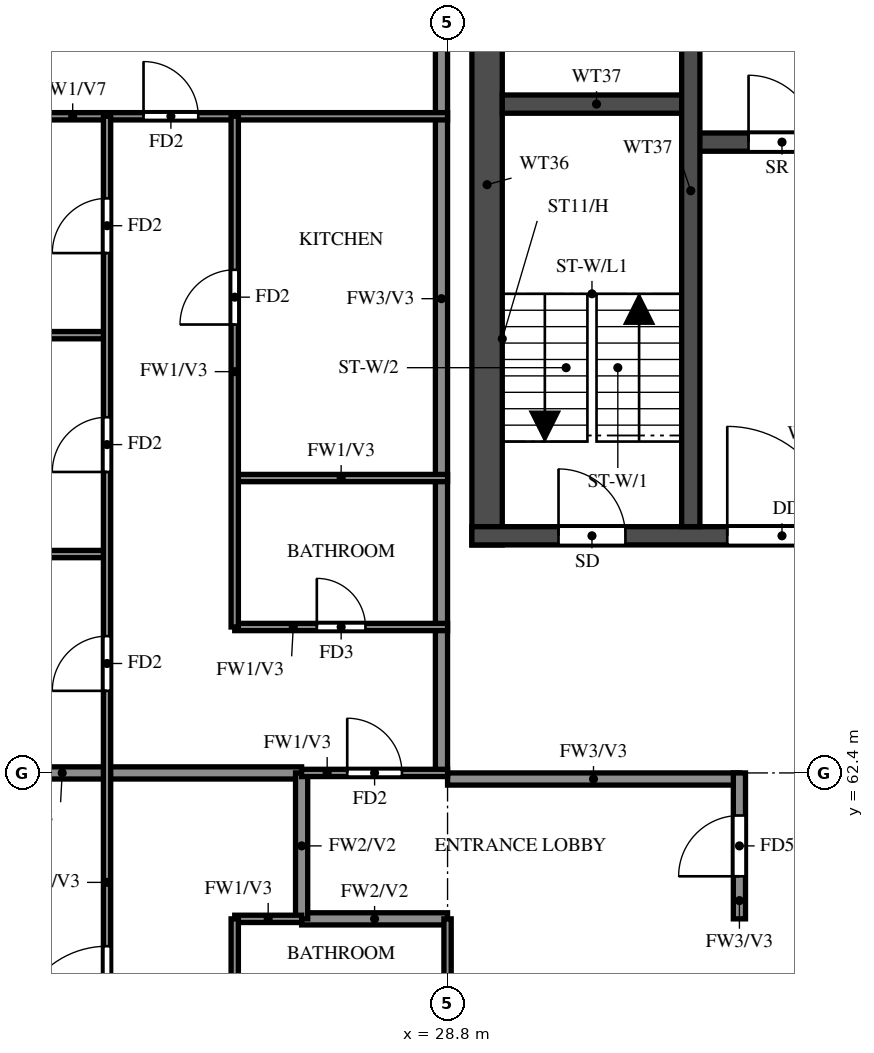
"""IFC4 building model, lengths in metres.
Left out: names, types, materials, properties, quantities, classifications, styles, units other than length and angle.
Written with IfcOpenShell. Run it as: python <this file> out.ifc"""

import sys

from ifc_helpers import new_model, si_unit, direction, frame, frame_2d, origin, place, context, subcontext, project, spatial, rectangle, extrude, element, fill, save


model = new_model("IFC4")
c1 = context("Model", 3, precision=1e-05, world=origin(), true_north=direction((0.0, 1.0)))
c2 = subcontext(c1, "Body", "Model", "MODEL_VIEW")
j1 = project(units=[si_unit("LENGTHUNIT", "METRE"), si_unit("PLANEANGLEUNIT", "RADIAN")], contexts=[c1])
p1 = place(None, origin())
s1 = spatial("IfcSite", under=j1, at=p1, CompositionType="ELEMENT")
p2 = place(p1, origin())
s2 = spatial("IfcBuilding", under=s1, at=p2, CompositionType="ELEMENT")
p3 = place(p2, frame((0.0, 0.0, 225.5)))
s3 = spatial("IfcBuildingStorey", under=s2, at=p3, CompositionType="ELEMENT", Elevation=225.5)
p4 = place(p3, frame((29.45, 66.15, 0.0), z_axis=(0.0, 0.0, 1.0), x_axis=(0.0, 1.0, 0.0)))
e1 = element("IfcWall", 1, at=p4, inside=s3, PredefinedType="SHEAR", context=c2, shape_type="SweptSolid", body=[
    extrude(rectangle(XDim=11.85, YDim=0.5, at=frame_2d((5.925, 0.0))), origin(), (0.0, 0.0, 1.0), 3.22),
])
p5 = place(p3, frame((29.2, 66.3, 0.0), z_axis=(0.0, 0.0, 1.0), x_axis=(1.0, 0.0, 0.0)))
e2 = element("IfcWall", 2, at=p5, inside=s3, PredefinedType="SHEAR", context=c2, shape_type="SweptSolid", body=[
    extrude(rectangle(XDim=42.4, YDim=0.3, at=frame_2d((21.2, 0.0))), origin(), (0.0, 0.0, 1.0), 3.22),
])
p6 = place(p5, frame((1.425, 0.0, 0.0)))
e3 = element("IfcOpeningElement", 3, at=p6, cuts=e2, PredefinedType="OPENING", context=c2, shape_type="SweptSolid", body=[
    extrude(rectangle(XDim=1.1, YDim=2.1, at=frame_2d((0.55, 1.05))), frame((0.0, 0.16, 0.0), z_axis=(0.0, -1.0, 0.0), x_axis=(1.0, 0.0, 0.0)), (0.0, 0.0, 1.0), 0.32),
])
p7 = place(p5, frame((4.2, 0.0, 0.0)))
e4 = element("IfcOpeningElement", 4, at=p7, cuts=e2, PredefinedType="OPENING", context=c2, shape_type="SweptSolid", body=[
    extrude(rectangle(XDim=1.8, YDim=2.1, at=frame_2d((0.9, 1.05))), frame((0.0, 0.16, 0.0), z_axis=(0.0, -1.0, 0.0), x_axis=(1.0, 0.0, 0.0)), (0.0, 0.0, 1.0), 0.32),
])
p8 = place(p3, frame((32.8, 72.775, 0.0), z_axis=(0.0, 0.0, 1.0), x_axis=(1.0, 0.0, 0.0)))
e5 = element("IfcWall", 5, at=p8, inside=s3, PredefinedType="SHEAR", context=c2, shape_type="SweptSolid", body=[
    extrude(rectangle(XDim=35.2, YDim=0.3, at=frame_2d((17.6, 0.0))), origin(), (0.0, 0.0, 1.0), 3.22),
])
p9 = place(p8, frame((19.8, 0.0, 0.0)))
e6 = element("IfcOpeningElement", 6, at=p9, cuts=e5, PredefinedType="OPENING", context=c2, shape_type="SweptSolid", body=[
    extrude(rectangle(XDim=1.1, YDim=2.1, at=frame_2d((0.55, 1.05))), frame((0.0, 0.16, 0.0), z_axis=(0.0, -1.0, 0.0), x_axis=(1.0, 0.0, 0.0)), (0.0, 0.0, 1.0), 0.32),
])
p10 = place(p8, frame((27.725, 0.0, 0.0)))
e7 = element("IfcOpeningElement", 7, at=p10, cuts=e5, PredefinedType="OPENING", context=c2, shape_type="SweptSolid", body=[
    extrude(rectangle(XDim=1.1, YDim=2.1, at=frame_2d((0.55, 1.05))), frame((0.0, 0.16, 0.0), z_axis=(0.0, -1.0, 0.0), x_axis=(1.0, 0.0, 0.0)), (0.0, 0.0, 1.0), 0.32),
])
p11 = place(p8, frame((30.325, 0.0, 0.0)))
e8 = element("IfcOpeningElement", 8, at=p11, cuts=e5, PredefinedType="OPENING", context=c2, shape_type="SweptSolid", body=[
    extrude(rectangle(XDim=1.1, YDim=2.1, at=frame_2d((0.55, 1.05))), frame((0.0, 0.16, 0.0), z_axis=(0.0, -1.0, 0.0), x_axis=(1.0, 0.0, 0.0)), (0.0, 0.0, 1.0), 0.32),
])
p12 = place(p8, frame((3.825, 0.0, 0.0)))
e9 = element("IfcOpeningElement", 9, at=p12, cuts=e5, PredefinedType="OPENING", context=c2, shape_type="SweptSolid", body=[
    extrude(rectangle(XDim=1.1, YDim=2.1, at=frame_2d((0.55, 1.05))), frame((0.0, 0.16, 0.0), z_axis=(0.0, -1.0, 0.0), x_axis=(1.0, 0.0, 0.0)), (0.0, 0.0, 1.0), 0.32),
])
p13 = place(p8, frame((6.575, 0.0, 0.0)))
e10 = element("IfcOpeningElement", 10, at=p13, cuts=e5, PredefinedType="OPENING", context=c2, shape_type="SweptSolid", body=[
    extrude(rectangle(XDim=1.1, YDim=2.1, at=frame_2d((0.55, 1.05))), frame((0.0, 0.16, 0.0), z_axis=(0.0, -1.0, 0.0), x_axis=(1.0, 0.0, 0.0)), (0.0, 0.0, 1.0), 0.32),
])
p14 = place(p8, frame((9.325, 0.0, 0.0)))
e11 = element("IfcOpeningElement", 11, at=p14, cuts=e5, PredefinedType="OPENING", context=c2, shape_type="SweptSolid", body=[
    extrude(rectangle(XDim=1.1, YDim=2.1, at=frame_2d((0.55, 1.05))), frame((0.0, 0.16, 0.0), z_axis=(0.0, -1.0, 0.0), x_axis=(1.0, 0.0, 0.0)), (0.0, 0.0, 1.0), 0.32),
])
p15 = place(p8, frame((12.075, 0.0, 0.0)))
e12 = element("IfcOpeningElement", 12, at=p15, cuts=e5, PredefinedType="OPENING", context=c2, shape_type="SweptSolid", body=[
    extrude(rectangle(XDim=1.1, YDim=2.1, at=frame_2d((0.55, 1.05))), frame((0.0, 0.16, 0.0), z_axis=(0.0, -1.0, 0.0), x_axis=(1.0, 0.0, 0.0)), (0.0, 0.0, 1.0), 0.32),
])
p16 = place(p8, frame((14.825, 0.0, 0.0)))
e13 = element("IfcOpeningElement", 13, at=p16, cuts=e5, PredefinedType="OPENING", context=c2, shape_type="SweptSolid", body=[
    extrude(rectangle(XDim=1.1, YDim=2.1, at=frame_2d((0.55, 1.05))), frame((0.0, 0.16, 0.0), z_axis=(0.0, -1.0, 0.0), x_axis=(1.0, 0.0, 0.0)), (0.0, 0.0, 1.0), 0.32),
])
p17 = place(p8, frame((17.575, 0.0, 0.0)))
e14 = element("IfcOpeningElement", 14, at=p17, cuts=e5, PredefinedType="OPENING", context=c2, shape_type="SweptSolid", body=[
    extrude(rectangle(XDim=1.1, YDim=2.1, at=frame_2d((0.55, 1.05))), frame((0.0, 0.16, 0.0), z_axis=(0.0, -1.0, 0.0), x_axis=(1.0, 0.0, 0.0)), (0.0, 0.0, 1.0), 0.32),
])
p18 = place(p8, frame((0.95, 0.0, 0.0)))
e15 = element("IfcOpeningElement", 15, at=p18, cuts=e5, PredefinedType="OPENING", context=c2, shape_type="SweptSolid", body=[
    extrude(rectangle(XDim=1.1, YDim=2.1, at=frame_2d((0.55, 1.05))), frame((0.0, 0.16, 0.0), z_axis=(0.0, -1.0, 0.0), x_axis=(1.0, 0.0, 0.0)), (0.0, 0.0, 1.0), 0.32),
])
p19 = place(p3, frame((29.7, 73.4, 0.0), z_axis=(0.0, 0.0, 1.0), x_axis=(1.0, 0.0, 0.0)))
e16 = element("IfcWall", 16, at=p19, inside=s3, PredefinedType="SHEAR", context=c2, shape_type="SweptSolid", body=[
    extrude(rectangle(XDim=3.1, YDim=0.3, at=frame_2d((1.55, 0.0))), origin(), (0.0, 0.0, 1.0), 3.22),
])
p20 = place(p3, frame((32.8, 66.45, 0.0), z_axis=(0.0, 0.0, 1.0), x_axis=(0.0, 1.0, 0.0)))
e17 = element("IfcWall", 17, at=p20, inside=s3, PredefinedType="SHEAR", context=c2, shape_type="SweptSolid", body=[
    extrude(rectangle(XDim=11.05, YDim=0.3, at=frame_2d((5.525, 0.0))), origin(), (0.0, 0.0, 1.0), 3.22),
])
p21 = place(p3, frame((28.8, 62.3, 0.0), z_axis=(0.0, 0.0, 1.0), x_axis=(1.0, 0.0, 0.0)))
e18 = element("IfcWall", 18, at=p21, inside=s3, PredefinedType="SOLIDWALL", context=c2, shape_type="SweptSolid", body=[
    extrude(rectangle(XDim=4.8, YDim=0.2, at=frame_2d((2.4, 0.0))), origin(), (0.0, 0.0, 1.0), 3.22),
])
p22 = place(p3, frame((28.7, 62.4, 0.0), z_axis=(0.0, 0.0, 1.0), x_axis=(0.0, 1.0, 0.0)))
e19 = element("IfcWall", 19, at=p22, inside=s3, PredefinedType="SOLIDWALL", context=c2, shape_type="SweptSolid", body=[
    extrude(rectangle(XDim=15.6, YDim=0.2, at=frame_2d((7.8, 0.0))), origin(), (0.0, 0.0, 1.0), 3.22),
])
p23 = place(p3, frame((33.6, 60.0, 0.0), z_axis=(0.0, 0.0, 1.0), x_axis=(0.0, 1.0, 0.0)))
e20 = element("IfcWall", 20, at=p23, inside=s3, PredefinedType="SOLIDWALL", context=c2, shape_type="SweptSolid", body=[
    extrude(rectangle(XDim=2.4, YDim=0.2, at=frame_2d((1.2, 0.0))), origin(), (0.0, 0.0, 1.0), 3.22),
])
p24 = place(p23, frame((0.7, 0.0, 0.0)))
e21 = element("IfcOpeningElement", 21, at=p24, cuts=e20, PredefinedType="OPENING", context=c2, shape_type="SweptSolid", body=[
    extrude(rectangle(XDim=1.0, YDim=2.1, at=frame_2d((0.5, 1.05))), frame((0.0, 0.11, 0.0), z_axis=(0.0, -1.0, 0.0), x_axis=(1.0, 0.0, 0.0)), (0.0, 0.0, 1.0), 0.22),
])
p25 = place(p3, frame((26.4, 60.0, 0.0), z_axis=(0.0, 0.0, 1.0), x_axis=(1.0, 0.0, 0.0)))
e22 = element("IfcWall", 22, at=p25, inside=s3, PredefinedType="SOLIDWALL", context=c2, shape_type="SweptSolid", body=[
    extrude(rectangle(XDim=2.4, YDim=0.2, at=frame_2d((1.2, 0.0))), origin(), (0.0, 0.0, 1.0), 3.22),
])
p26 = place(p3, frame((18.525, 62.4, 0.0), z_axis=(0.0, 0.0, 1.0), x_axis=(1.0, 0.0, 0.0)))
e23 = element("IfcWall", 23, at=p26, inside=s3, PredefinedType="SOLIDWALL", context=c2, shape_type="SweptSolid", body=[
    extrude(rectangle(XDim=7.875, YDim=0.2, at=frame_2d((3.938, 0.0))), origin(), (0.0, 0.0, 1.0), 3.22),
])
p27 = place(p3, frame((26.4, 60.0, 0.0), z_axis=(0.0, 0.0, 1.0), x_axis=(0.0, 1.0, 0.0)))
e24 = element("IfcWall", 24, at=p27, inside=s3, PredefinedType="SOLIDWALL", context=c2, shape_type="SweptSolid", body=[
    extrude(rectangle(XDim=2.4, YDim=0.2, at=frame_2d((1.2, 0.0))), origin(), (0.0, 0.0, 1.0), 3.22),
])
p28 = place(p3, frame((25.3, 60.0, 0.0), z_axis=(0.0, 0.0, 1.0), x_axis=(1.0, 0.0, 0.0)))
e25 = element("IfcWall", 25, at=p28, inside=s3, PredefinedType="PARTITIONING", context=c2, shape_type="SweptSolid", body=[
    extrude(rectangle(XDim=1.1, YDim=0.12, at=frame_2d((0.55, 0.0))), origin(), (0.0, 0.0, 1.0), 3.22),
])
p29 = place(p3, frame((26.4, 62.4, 0.0), z_axis=(0.0, 0.0, 1.0), x_axis=(1.0, 0.0, 0.0)))
e26 = element("IfcWall", 26, at=p29, inside=s3, PredefinedType="PARTITIONING", context=c2, shape_type="SweptSolid", body=[
    extrude(rectangle(XDim=2.4, YDim=0.12, at=frame_2d((1.2, 0.0))), origin(), (0.0, 0.0, 1.0), 3.22),
])
p30 = place(p29, frame((0.75, 0.0, 0.0)))
e27 = element("IfcOpeningElement", 27, at=p30, cuts=e26, PredefinedType="OPENING", context=c2, shape_type="SweptSolid", body=[
    extrude(rectangle(XDim=0.9, YDim=2.1, at=frame_2d((0.45, 1.05))), frame((0.0, 0.07, 0.0), z_axis=(0.0, -1.0, 0.0), x_axis=(1.0, 0.0, 0.0)), (0.0, 0.0, 1.0), 0.14),
])
p31 = place(p3, frame((25.3, 64.8, 0.0), z_axis=(0.0, 0.0, 1.0), x_axis=(1.0, 0.0, 0.0)))
e28 = element("IfcWall", 28, at=p31, inside=s3, PredefinedType="PARTITIONING", context=c2, shape_type="SweptSolid", body=[
    extrude(rectangle(XDim=3.5, YDim=0.12, at=frame_2d((1.75, 0.0))), origin(), (0.0, 0.0, 1.0), 3.22),
])
p32 = place(p31, frame((1.35, 0.0, 0.0)))
e29 = element("IfcOpeningElement", 29, at=p32, cuts=e28, PredefinedType="OPENING", context=c2, shape_type="SweptSolid", body=[
    extrude(rectangle(XDim=0.8, YDim=2.1, at=frame_2d((0.4, 1.05))), frame((0.0, 0.07, 0.0), z_axis=(0.0, -1.0, 0.0), x_axis=(1.0, 0.0, 0.0)), (0.0, 0.0, 1.0), 0.14),
])
p33 = place(p3, frame((18.525, 66.0, 0.0), z_axis=(0.0, 0.0, 1.0), x_axis=(1.0, 0.0, 0.0)))
e30 = element("IfcWall", 30, at=p33, inside=s3, PredefinedType="PARTITIONING", context=c2, shape_type="SweptSolid", body=[
    extrude(rectangle(XDim=4.675, YDim=0.12, at=frame_2d((2.337, 0.0))), origin(), (0.0, 0.0, 1.0), 2.32),
])
p34 = place(p3, frame((25.3, 67.25, 0.0), z_axis=(0.0, 0.0, 1.0), x_axis=(1.0, 0.0, 0.0)))
e31 = element("IfcWall", 31, at=p34, inside=s3, PredefinedType="PARTITIONING", context=c2, shape_type="SweptSolid", body=[
    extrude(rectangle(XDim=3.5, YDim=0.12, at=frame_2d((1.75, 0.0))), origin(), (0.0, 0.0, 1.0), 3.22),
])
p35 = place(p3, frame((18.525, 69.6, 0.0), z_axis=(0.0, 0.0, 1.0), x_axis=(1.0, 0.0, 0.0)))
e32 = element("IfcWall", 32, at=p35, inside=s3, PredefinedType="PARTITIONING", context=c2, shape_type="SweptSolid", body=[
    extrude(rectangle(XDim=4.675, YDim=0.12, at=frame_2d((2.337, 0.0))), origin(), (0.0, 0.0, 1.0), 3.22),
])
p36 = place(p3, frame((18.525, 73.2, 0.0), z_axis=(0.0, 0.0, 1.0), x_axis=(1.0, 0.0, 0.0)))
e33 = element("IfcWall", 33, at=p36, inside=s3, PredefinedType="PARTITIONING", context=c2, shape_type="SweptSolid", body=[
    extrude(rectangle(XDim=10.275, YDim=0.12, at=frame_2d((5.138, 0.0))), origin(), (0.0, 0.0, 1.0), 2.32),
])
p37 = place(p36, frame((5.275, 0.0, 0.0)))
e34 = element("IfcOpeningElement", 34, at=p37, cuts=e33, PredefinedType="OPENING", context=c2, shape_type="SweptSolid", body=[
    extrude(rectangle(XDim=0.9, YDim=2.1, at=frame_2d((0.45, 1.05))), frame((0.0, 0.07, 0.0), z_axis=(0.0, -1.0, 0.0), x_axis=(1.0, 0.0, 0.0)), (0.0, 0.0, 1.0), 0.14),
])
p38 = place(p3, frame((23.2, 48.0, 0.0), z_axis=(0.0, 0.0, 1.0), x_axis=(0.0, 1.0, 0.0)))
e35 = element("IfcWall", 35, at=p38, inside=s3, PredefinedType="PARTITIONING", context=c2, shape_type="SweptSolid", body=[
    extrude(rectangle(XDim=25.2, YDim=0.12, at=frame_2d((12.6, 0.0))), origin(), (0.0, 0.0, 1.0), 3.22),
])
p39 = place(p38, frame((1.35, 0.0, 0.0)))
e36 = element("IfcOpeningElement", 36, at=p39, cuts=e35, PredefinedType="OPENING", context=c2, shape_type="SweptSolid", body=[
    extrude(rectangle(XDim=0.9, YDim=2.1, at=frame_2d((0.45, 1.05))), frame((0.0, 0.07, 0.0), z_axis=(0.0, -1.0, 0.0), x_axis=(1.0, 0.0, 0.0)), (0.0, 0.0, 1.0), 0.14),
])
p40 = place(p38, frame((4.95, 0.0, 0.0)))
e37 = element("IfcOpeningElement", 37, at=p40, cuts=e35, PredefinedType="OPENING", context=c2, shape_type="SweptSolid", body=[
    extrude(rectangle(XDim=0.9, YDim=2.1, at=frame_2d((0.45, 1.05))), frame((0.0, 0.07, 0.0), z_axis=(0.0, -1.0, 0.0), x_axis=(1.0, 0.0, 0.0)), (0.0, 0.0, 1.0), 0.14),
])
p41 = place(p38, frame((10.05, 0.0, 0.0)))
e38 = element("IfcOpeningElement", 38, at=p41, cuts=e35, PredefinedType="OPENING", context=c2, shape_type="SweptSolid", body=[
    extrude(rectangle(XDim=1.5, YDim=2.1, at=frame_2d((0.75, 1.05))), frame((0.0, 0.07, 0.0), z_axis=(0.0, -1.0, 0.0), x_axis=(1.0, 0.0, 0.0)), (0.0, 0.0, 1.0), 0.14),
])
p42 = place(p38, frame((15.75, 0.0, 0.0)))
e39 = element("IfcOpeningElement", 39, at=p42, cuts=e35, PredefinedType="OPENING", context=c2, shape_type="SweptSolid", body=[
    extrude(rectangle(XDim=0.9, YDim=2.1, at=frame_2d((0.45, 1.05))), frame((0.0, 0.07, 0.0), z_axis=(0.0, -1.0, 0.0), x_axis=(1.0, 0.0, 0.0)), (0.0, 0.0, 1.0), 0.14),
])
p43 = place(p38, frame((19.35, 0.0, 0.0)))
e40 = element("IfcOpeningElement", 40, at=p43, cuts=e35, PredefinedType="OPENING", context=c2, shape_type="SweptSolid", body=[
    extrude(rectangle(XDim=0.9, YDim=2.1, at=frame_2d((0.45, 1.05))), frame((0.0, 0.07, 0.0), z_axis=(0.0, -1.0, 0.0), x_axis=(1.0, 0.0, 0.0)), (0.0, 0.0, 1.0), 0.14),
])
p44 = place(p38, frame((22.95, 0.0, 0.0)))
e41 = element("IfcOpeningElement", 41, at=p44, cuts=e35, PredefinedType="OPENING", context=c2, shape_type="SweptSolid", body=[
    extrude(rectangle(XDim=0.9, YDim=2.1, at=frame_2d((0.45, 1.05))), frame((0.0, 0.07, 0.0), z_axis=(0.0, -1.0, 0.0), x_axis=(1.0, 0.0, 0.0)), (0.0, 0.0, 1.0), 0.14),
])
p45 = place(p3, frame((25.3, 57.6, 0.0), z_axis=(0.0, 0.0, 1.0), x_axis=(0.0, 1.0, 0.0)))
e42 = element("IfcWall", 42, at=p45, inside=s3, PredefinedType="PARTITIONING", context=c2, shape_type="SweptSolid", body=[
    extrude(rectangle(XDim=2.4, YDim=0.12, at=frame_2d((1.2, 0.0))), origin(), (0.0, 0.0, 1.0), 3.22),
])
p46 = place(p3, frame((25.3, 64.8, 0.0), z_axis=(0.0, 0.0, 1.0), x_axis=(0.0, 1.0, 0.0)))
e43 = element("IfcWall", 43, at=p46, inside=s3, PredefinedType="PARTITIONING", context=c2, shape_type="SweptSolid", body=[
    extrude(rectangle(XDim=8.4, YDim=0.12, at=frame_2d((4.2, 0.0))), origin(), (0.0, 0.0, 1.0), 3.22),
])
p47 = place(p46, frame((4.975, 0.0, 0.0)))
e44 = element("IfcOpeningElement", 44, at=p47, cuts=e43, PredefinedType="OPENING", context=c2, shape_type="SweptSolid", body=[
    extrude(rectangle(XDim=0.9, YDim=2.1, at=frame_2d((0.45, 1.05))), frame((0.0, 0.07, 0.0), z_axis=(0.0, -1.0, 0.0), x_axis=(1.0, 0.0, 0.0)), (0.0, 0.0, 1.0), 0.14),
])
p48 = place(p3, frame((28.8, 57.6, 0.0), z_axis=(0.0, 0.0, 1.0), x_axis=(0.0, 1.0, 0.0)))
e45 = element("IfcWall", 45, at=p48, inside=s3, PredefinedType="PARTITIONING", context=c2, shape_type="SweptSolid", body=[
    extrude(rectangle(XDim=2.4, YDim=0.12, at=frame_2d((1.2, 0.0))), origin(), (0.0, 0.0, 1.0), 3.22),
])
p49 = place(p6, origin())
e46 = element("IfcDoor", 46, at=p49, inside=s3, OperationType="SINGLE_SWING_LEFT", PredefinedType="DOOR", context=c2, shape_type="SweptSolid", body=[
    extrude(rectangle(XDim=1.1, YDim=2.1, at=frame_2d((0.55, 1.05))), frame((0.0, 0.025, 0.0), z_axis=(0.0, -1.0, 0.0), x_axis=(1.0, 0.0, 0.0)), (0.0, 0.0, 1.0), 0.05),
])
fill(e3, e46)
p50 = place(p7, origin())
e47 = element("IfcDoor", 47, at=p50, inside=s3, OperationType="DOUBLE_DOOR_SINGLE_SWING", PredefinedType="DOOR", context=c2, shape_type="SweptSolid", body=[
    extrude(rectangle(XDim=1.8, YDim=2.1, at=frame_2d((0.9, 1.05))), frame((0.0, 0.025, 0.0), z_axis=(0.0, -1.0, 0.0), x_axis=(1.0, 0.0, 0.0)), (0.0, 0.0, 1.0), 0.05),
])
fill(e4, e47)
p51 = place(p18, origin())
e48 = element("IfcDoor", 48, at=p51, inside=s3, OperationType="SINGLE_SWING_LEFT", PredefinedType="DOOR", context=c2, shape_type="SweptSolid", body=[
    extrude(rectangle(XDim=1.1, YDim=2.1, at=frame_2d((0.55, 1.05))), frame((0.0, 0.025, 0.0), z_axis=(0.0, -1.0, 0.0), x_axis=(1.0, 0.0, 0.0)), (0.0, 0.0, 1.0), 0.05),
])
fill(e15, e48)
p52 = place(p41, origin())
e49 = element("IfcDoor", 49, at=p52, inside=s3, OperationType="SINGLE_SWING_LEFT", PredefinedType="DOOR", context=c2, shape_type="SweptSolid", body=[
    extrude(rectangle(XDim=1.5, YDim=2.1, at=frame_2d((0.75, 1.05))), frame((0.0, 0.025, 0.0), z_axis=(0.0, -1.0, 0.0), x_axis=(1.0, 0.0, 0.0)), (0.0, 0.0, 1.0), 0.05),
])
fill(e38, e49)
p53 = place(p30, origin())
e50 = element("IfcDoor", 50, at=p53, inside=s3, OperationType="SINGLE_SWING_LEFT", PredefinedType="DOOR", context=c2, shape_type="SweptSolid", body=[
    extrude(rectangle(XDim=0.9, YDim=2.1, at=frame_2d((0.45, 1.05))), frame((0.0, 0.025, 0.0), z_axis=(0.0, -1.0, 0.0), x_axis=(1.0, 0.0, 0.0)), (0.0, 0.0, 1.0), 0.05),
])
fill(e27, e50)
p54 = place(p24, origin())
e51 = element("IfcDoor", 51, at=p54, inside=s3, OperationType="SINGLE_SWING_RIGHT", PredefinedType="DOOR", context=c2, shape_type="SweptSolid", body=[
    extrude(rectangle(XDim=1.0, YDim=2.1, at=frame_2d((0.5, 1.05))), frame((0.0, 0.025, 0.0), z_axis=(0.0, -1.0, 0.0), x_axis=(1.0, 0.0, 0.0)), (0.0, 0.0, 1.0), 0.05),
])
fill(e21, e51)
p55 = place(p42, origin())
e52 = element("IfcDoor", 52, at=p55, inside=s3, OperationType="SINGLE_SWING_LEFT", PredefinedType="DOOR", context=c2, shape_type="SweptSolid", body=[
    extrude(rectangle(XDim=0.9, YDim=2.1, at=frame_2d((0.45, 1.05))), frame((0.0, 0.025, 0.0), z_axis=(0.0, -1.0, 0.0), x_axis=(1.0, 0.0, 0.0)), (0.0, 0.0, 1.0), 0.05),
])
fill(e39, e52)
p56 = place(p43, origin())
e53 = element("IfcDoor", 53, at=p56, inside=s3, OperationType="SINGLE_SWING_LEFT", PredefinedType="DOOR", context=c2, shape_type="SweptSolid", body=[
    extrude(rectangle(XDim=0.9, YDim=2.1, at=frame_2d((0.45, 1.05))), frame((0.0, 0.025, 0.0), z_axis=(0.0, -1.0, 0.0), x_axis=(1.0, 0.0, 0.0)), (0.0, 0.0, 1.0), 0.05),
])
fill(e40, e53)
p57 = place(p44, origin())
e54 = element("IfcDoor", 54, at=p57, inside=s3, OperationType="SINGLE_SWING_RIGHT", PredefinedType="DOOR", context=c2, shape_type="SweptSolid", body=[
    extrude(rectangle(XDim=0.9, YDim=2.1, at=frame_2d((0.45, 1.05))), frame((0.0, 0.025, 0.0), z_axis=(0.0, -1.0, 0.0), x_axis=(1.0, 0.0, 0.0)), (0.0, 0.0, 1.0), 0.05),
])
fill(e41, e54)
p58 = place(p37, origin())
e55 = element("IfcDoor", 55, at=p58, inside=s3, OperationType="SINGLE_SWING_LEFT", PredefinedType="DOOR", context=c2, shape_type="SweptSolid", body=[
    extrude(rectangle(XDim=0.9, YDim=2.1, at=frame_2d((0.45, 1.05))), frame((0.0, 0.025, 0.0), z_axis=(0.0, -1.0, 0.0), x_axis=(1.0, 0.0, 0.0)), (0.0, 0.0, 1.0), 0.05),
])
fill(e34, e55)
p59 = place(p32, origin())
e56 = element("IfcDoor", 56, at=p59, inside=s3, OperationType="SINGLE_SWING_LEFT", PredefinedType="DOOR", context=c2, shape_type="SweptSolid", body=[
    extrude(rectangle(XDim=0.8, YDim=2.1, at=frame_2d((0.4, 1.05))), frame((0.0, 0.025, 0.0), z_axis=(0.0, -1.0, 0.0), x_axis=(1.0, 0.0, 0.0)), (0.0, 0.0, 1.0), 0.05),
])
fill(e29, e56)
p60 = place(p47, origin())
e57 = element("IfcDoor", 57, at=p60, inside=s3, OperationType="SINGLE_SWING_RIGHT", PredefinedType="DOOR", context=c2, shape_type="SweptSolid", body=[
    extrude(rectangle(XDim=0.9, YDim=2.1, at=frame_2d((0.45, 1.05))), frame((0.0, 0.025, 0.0), z_axis=(0.0, -1.0, 0.0), x_axis=(1.0, 0.0, 0.0)), (0.0, 0.0, 1.0), 0.05),
])
fill(e44, e57)
save(model, sys.argv[1])
